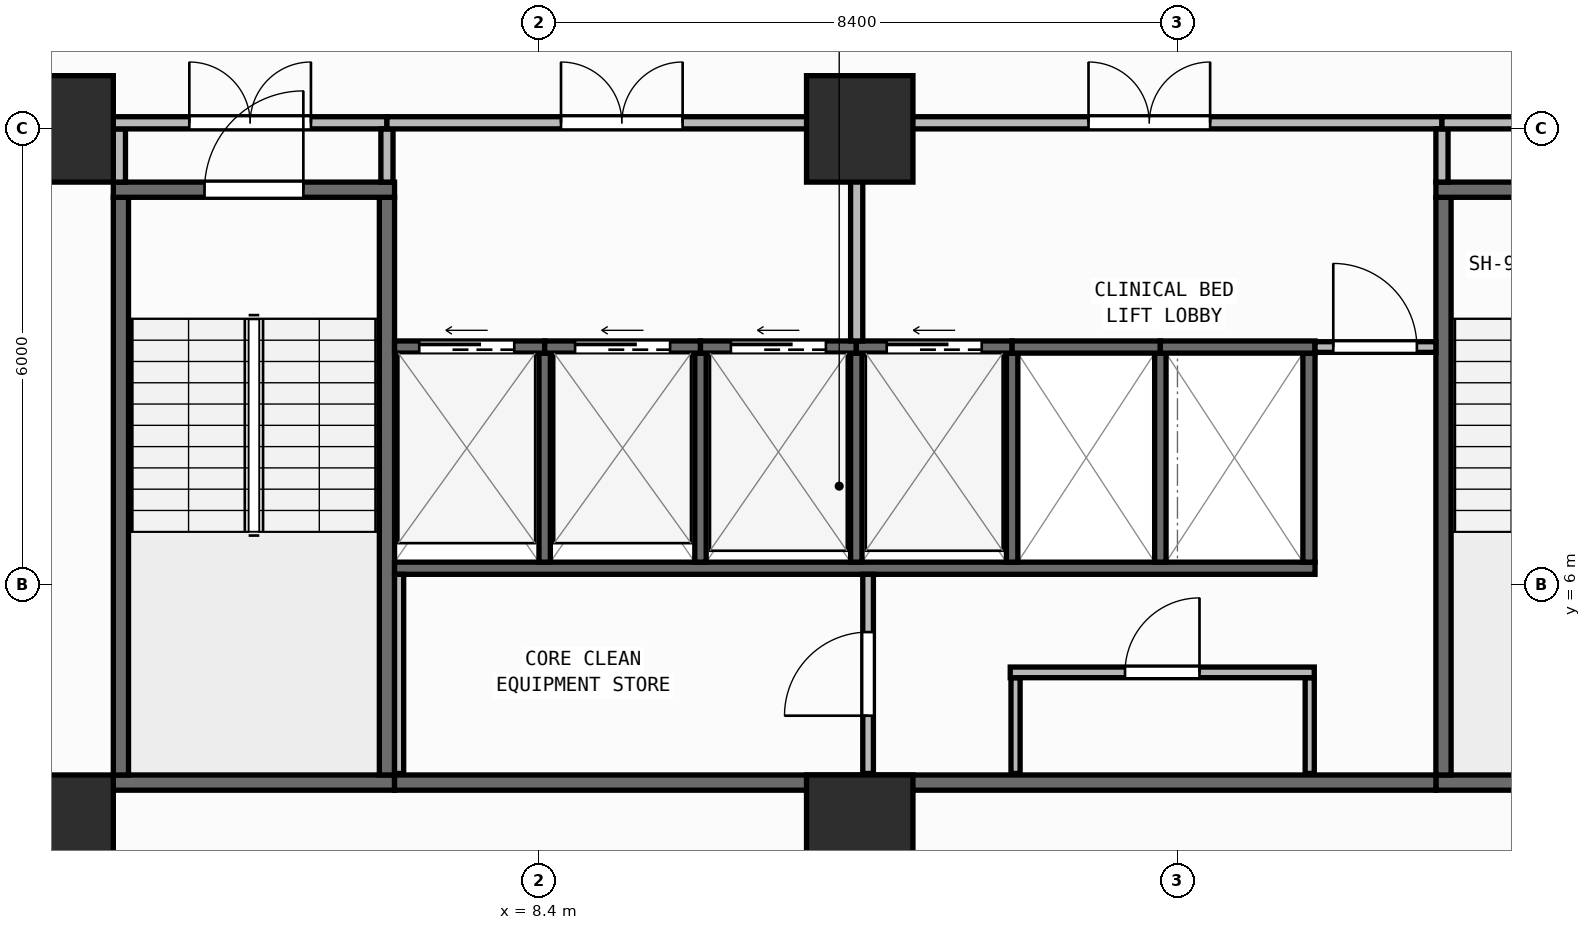
"""IFC4 building model, lengths in metres.
Left out: names, types, materials, properties, quantities, classifications, styles, units other than length and angle.
Written with IfcOpenShell. Run it as: python <this file> out.ifc"""

import sys

from ifc_helpers import new_model, si_unit, direction, frame, frame_2d, origin, origin_2d, place, context, subcontext, project, spatial, rectangle, extrude, element, fill, save


model = new_model("IFC4")
c1 = context("Model", 3, precision=1e-05, world=origin(), true_north=direction((0.0, 1.0)))
c2 = subcontext(c1, "Body", "Model", "MODEL_VIEW")
j1 = project(units=[si_unit("LENGTHUNIT", "METRE"), si_unit("PLANEANGLEUNIT", "RADIAN")], contexts=[c1])
p1 = place(None, origin())
s1 = spatial("IfcSite", under=j1, at=p1, CompositionType="ELEMENT")
p2 = place(p1, origin())
s2 = spatial("IfcBuilding", under=s1, at=p2, CompositionType="ELEMENT")
p3 = place(p2, frame((0.0, 0.0, 62.0)))
s3 = spatial("IfcBuildingStorey", under=s2, at=p3, CompositionType="ELEMENT", Elevation=62.0)
for number, where, z_axis, x_axis in (
    (1, (2.1, 2.8, 0.0), (0.0, 0.0, 1.0), (1.0, 0.0, 0.0)),
    (2, (12.62, 2.8, 0.0), (0.0, 0.0, 1.0), (1.0, 0.0, 0.0)),
    (3, (2.1, 12.0, 0.0), (0.0, 0.0, 1.0), (1.0, 0.0, 0.0)),
    (4, (12.62, 12.0, 0.0), (0.0, 0.0, 1.0), (1.0, 0.0, 0.0)),
):
    element("IfcColumn", number, at=place(p3, frame(where, z_axis=z_axis, x_axis=x_axis)), inside=s3, PredefinedType="COLUMN", context=c2, shape_type="SweptSolid", body=[
        extrude(rectangle(XDim=1.4, YDim=1.4, at=origin_2d()), origin(), (0.0, 0.0, 1.0), 3.95),
    ])
p4 = place(p3, frame((2.76, 0.174, 0.0), z_axis=(0.0, 0.0, 1.0), x_axis=(0.996571478456, 0.082736257641, 0.0)))
e5 = element("IfcWall", 5, at=p4, inside=s3, PredefinedType="STANDARD", context=c2, shape_type="SweptSolid", body=[
    extrude(rectangle(XDim=52.861, YDim=0.26, at=frame_2d((26.431, 0.0))), origin(), (0.0, 0.0, 1.0), 3.71),
])
p5 = place(p4, frame((25.231, 0.0, 0.9)))
e6 = element("IfcOpeningElement", 6, at=p5, cuts=e5, PredefinedType="OPENING", context=c2, shape_type="SweptSolid", body=[
    extrude(rectangle(XDim=2.4, YDim=1.65, at=frame_2d((1.2, 0.825))), frame((0.0, 0.14, 0.0), z_axis=(0.0, -1.0, 0.0), x_axis=(1.0, 0.0, 0.0)), (0.0, 0.0, 1.0), 0.28),
])
p6 = place(p3, frame((2.8, 3.4, 0.0), z_axis=(0.0, 0.0, 1.0), x_axis=(1.0, 0.0, 0.0)))
e7 = element("IfcWall", 7, at=p6, inside=s3, PredefinedType="SHEAR", context=c2, shape_type="SweptSolid", body=[
    extrude(rectangle(XDim=3.7, YDim=0.2, at=frame_2d((1.85, 0.0))), origin(), (0.0, 0.0, 1.0), 3.71),
])
for number, where, z_axis, x_axis in (
    (8, (2.9, 3.5, 0.0), (0.0, 0.0, 1.0), (0.0, 1.0, 0.0)),
    (9, (6.4, 3.5, 0.0), (0.0, 0.0, 1.0), (0.0, 1.0, 0.0)),
):
    element("IfcWall", number, at=place(p3, frame(where, z_axis=z_axis, x_axis=x_axis)), inside=s3, PredefinedType="SHEAR", context=c2, shape_type="SweptSolid", body=[
        extrude(rectangle(XDim=7.6, YDim=0.2, at=frame_2d((3.8, 0.0))), origin(), (0.0, 0.0, 1.0), 3.71),
    ])
p7 = place(p3, frame((2.8, 11.2, 0.0), z_axis=(0.0, 0.0, 1.0), x_axis=(1.0, 0.0, 0.0)))
e10 = element("IfcWall", 10, at=p7, inside=s3, PredefinedType="SHEAR", context=c2, shape_type="SweptSolid", body=[
    extrude(rectangle(XDim=3.7, YDim=0.2, at=frame_2d((1.85, 0.0))), origin(), (0.0, 0.0, 1.0), 3.71),
])
p8 = place(p7, frame((1.2, 0.0, 0.0)))
e11 = element("IfcOpeningElement", 11, at=p8, cuts=e10, PredefinedType="OPENING", context=c2, shape_type="SweptSolid", body=[
    extrude(rectangle(XDim=1.3, YDim=2.15, at=frame_2d((0.65, 1.075))), frame((0.0, 0.11, 0.0), z_axis=(0.0, -1.0, 0.0), x_axis=(1.0, 0.0, 0.0)), (0.0, 0.0, 1.0), 0.22),
])
p9 = place(p3, frame((20.2, 3.4, 0.0), z_axis=(0.0, 0.0, 1.0), x_axis=(1.0, 0.0, 0.0)))
e12 = element("IfcWall", 12, at=p9, inside=s3, PredefinedType="SHEAR", context=c2, shape_type="SweptSolid", body=[
    extrude(rectangle(XDim=3.7, YDim=0.2, at=frame_2d((1.85, 0.0))), origin(), (0.0, 0.0, 1.0), 3.71),
])
p10 = place(p3, frame((20.3, 3.5, 0.0), z_axis=(0.0, 0.0, 1.0), x_axis=(0.0, 1.0, 0.0)))
e13 = element("IfcWall", 13, at=p10, inside=s3, PredefinedType="SHEAR", context=c2, shape_type="SweptSolid", body=[
    extrude(rectangle(XDim=7.6, YDim=0.2, at=frame_2d((3.8, 0.0))), origin(), (0.0, 0.0, 1.0), 3.71),
])
p11 = place(p3, frame((20.2, 11.2, 0.0), z_axis=(0.0, 0.0, 1.0), x_axis=(1.0, 0.0, 0.0)))
e14 = element("IfcWall", 14, at=p11, inside=s3, PredefinedType="SHEAR", context=c2, shape_type="SweptSolid", body=[
    extrude(rectangle(XDim=3.7, YDim=0.2, at=frame_2d((1.85, 0.0))), origin(), (0.0, 0.0, 1.0), 3.71),
])
p12 = place(p11, frame((1.2, 0.0, 0.0)))
e15 = element("IfcOpeningElement", 15, at=p12, cuts=e14, PredefinedType="OPENING", context=c2, shape_type="SweptSolid", body=[
    extrude(rectangle(XDim=1.3, YDim=2.15, at=frame_2d((0.65, 1.075))), frame((0.0, 0.11, 0.0), z_axis=(0.0, -1.0, 0.0), x_axis=(1.0, 0.0, 0.0)), (0.0, 0.0, 1.0), 0.22),
])
p13 = place(p3, frame((6.5, 3.4, 0.0), z_axis=(0.0, 0.0, 1.0), x_axis=(1.0, 0.0, 0.0)))
e16 = element("IfcWall", 16, at=p13, inside=s3, PredefinedType="SHEAR", context=c2, shape_type="SweptSolid", body=[
    extrude(rectangle(XDim=13.7, YDim=0.2, at=frame_2d((6.85, 0.0))), origin(), (0.0, 0.0, 1.0), 3.71),
])
p14 = place(p3, frame((6.5, 6.22, 0.0), z_axis=(0.0, 0.0, 1.0), x_axis=(1.0, 0.0, 0.0)))
e17 = element("IfcWall", 17, at=p14, inside=s3, PredefinedType="SHEAR", context=c2, shape_type="SweptSolid", body=[
    extrude(rectangle(XDim=12.11, YDim=0.16, at=frame_2d((6.055, 0.0))), origin(), (0.0, 0.0, 1.0), 3.71),
])
p15 = place(p3, frame((18.53, 6.3, 0.0), z_axis=(0.0, 0.0, 1.0), x_axis=(0.0, 1.0, 0.0)))
e18 = element("IfcWall", 18, at=p15, inside=s3, PredefinedType="SHEAR", context=c2, shape_type="SweptSolid", body=[
    extrude(rectangle(XDim=2.75, YDim=0.16, at=frame_2d((1.375, 0.0))), origin(), (0.0, 0.0, 1.0), 3.71),
])
for number, where, z_axis, x_axis in (
    (19, (8.475, 6.3, 0.0), (0.0, 0.0, 1.0), (0.0, 1.0, 0.0)),
    (20, (10.525, 6.3, 0.0), (0.0, 0.0, 1.0), (0.0, 1.0, 0.0)),
    (21, (12.575, 6.3, 0.0), (0.0, 0.0, 1.0), (0.0, 1.0, 0.0)),
    (22, (14.625, 6.3, 0.0), (0.0, 0.0, 1.0), (0.0, 1.0, 0.0)),
    (23, (16.575, 6.3, 0.0), (0.0, 0.0, 1.0), (0.0, 1.0, 0.0)),
):
    element("IfcWall", number, at=place(p3, frame(where, z_axis=z_axis, x_axis=x_axis)), inside=s3, PredefinedType="SHEAR", context=c2, shape_type="SweptSolid", body=[
        extrude(rectangle(XDim=2.75, YDim=0.15, at=frame_2d((1.375, 0.0))), origin(), (0.0, 0.0, 1.0), 3.71),
    ])
p16 = place(p3, frame((6.5, 9.13, 0.0), z_axis=(0.0, 0.0, 1.0), x_axis=(1.0, 0.0, 0.0)))
e24 = element("IfcWall", 24, at=p16, inside=s3, PredefinedType="SHEAR", context=c2, shape_type="SweptSolid", body=[
    extrude(rectangle(XDim=1.975, YDim=0.16, at=frame_2d((0.988, 0.0))), origin(), (0.0, 0.0, 1.0), 3.71),
])
p17 = place(p16, frame((0.325, 0.0, 0.0)))
e25 = element("IfcOpeningElement", 25, at=p17, cuts=e24, PredefinedType="OPENING", context=c2, shape_type="SweptSolid", body=[
    extrude(rectangle(XDim=1.25, YDim=2.15, at=frame_2d((0.625, 1.075))), frame((0.0, 0.09, 0.0), z_axis=(0.0, -1.0, 0.0), x_axis=(1.0, 0.0, 0.0)), (0.0, 0.0, 1.0), 0.18),
])
p18 = place(p3, frame((8.475, 9.13, 0.0), z_axis=(0.0, 0.0, 1.0), x_axis=(1.0, 0.0, 0.0)))
e26 = element("IfcWall", 26, at=p18, inside=s3, PredefinedType="SHEAR", context=c2, shape_type="SweptSolid", body=[
    extrude(rectangle(XDim=2.05, YDim=0.16, at=frame_2d((1.025, 0.0))), origin(), (0.0, 0.0, 1.0), 3.71),
])
p19 = place(p18, frame((0.4, 0.0, 0.0)))
e27 = element("IfcOpeningElement", 27, at=p19, cuts=e26, PredefinedType="OPENING", context=c2, shape_type="SweptSolid", body=[
    extrude(rectangle(XDim=1.25, YDim=2.15, at=frame_2d((0.625, 1.075))), frame((0.0, 0.09, 0.0), z_axis=(0.0, -1.0, 0.0), x_axis=(1.0, 0.0, 0.0)), (0.0, 0.0, 1.0), 0.18),
])
p20 = place(p3, frame((10.525, 9.13, 0.0), z_axis=(0.0, 0.0, 1.0), x_axis=(1.0, 0.0, 0.0)))
e28 = element("IfcWall", 28, at=p20, inside=s3, PredefinedType="SHEAR", context=c2, shape_type="SweptSolid", body=[
    extrude(rectangle(XDim=2.05, YDim=0.16, at=frame_2d((1.025, 0.0))), origin(), (0.0, 0.0, 1.0), 3.71),
])
p21 = place(p20, frame((0.4, 0.0, 0.0)))
e29 = element("IfcOpeningElement", 29, at=p21, cuts=e28, PredefinedType="OPENING", context=c2, shape_type="SweptSolid", body=[
    extrude(rectangle(XDim=1.25, YDim=2.15, at=frame_2d((0.625, 1.075))), frame((0.0, 0.09, 0.0), z_axis=(0.0, -1.0, 0.0), x_axis=(1.0, 0.0, 0.0)), (0.0, 0.0, 1.0), 0.18),
])
p22 = place(p3, frame((12.575, 9.13, 0.0), z_axis=(0.0, 0.0, 1.0), x_axis=(1.0, 0.0, 0.0)))
e30 = element("IfcWall", 30, at=p22, inside=s3, PredefinedType="SHEAR", context=c2, shape_type="SweptSolid", body=[
    extrude(rectangle(XDim=2.05, YDim=0.16, at=frame_2d((1.025, 0.0))), origin(), (0.0, 0.0, 1.0), 3.71),
])
p23 = place(p22, frame((0.4, 0.0, 0.0)))
e31 = element("IfcOpeningElement", 31, at=p23, cuts=e30, PredefinedType="OPENING", context=c2, shape_type="SweptSolid", body=[
    extrude(rectangle(XDim=1.25, YDim=2.15, at=frame_2d((0.625, 1.075))), frame((0.0, 0.09, 0.0), z_axis=(0.0, -1.0, 0.0), x_axis=(1.0, 0.0, 0.0)), (0.0, 0.0, 1.0), 0.18),
])
p24 = place(p3, frame((14.625, 9.13, 0.0), z_axis=(0.0, 0.0, 1.0), x_axis=(1.0, 0.0, 0.0)))
e32 = element("IfcWall", 32, at=p24, inside=s3, PredefinedType="SHEAR", context=c2, shape_type="SweptSolid", body=[
    extrude(rectangle(XDim=1.95, YDim=0.16, at=frame_2d((0.975, 0.0))), origin(), (0.0, 0.0, 1.0), 3.71),
])
p25 = place(p3, frame((16.575, 9.13, 0.0), z_axis=(0.0, 0.0, 1.0), x_axis=(1.0, 0.0, 0.0)))
e33 = element("IfcWall", 33, at=p25, inside=s3, PredefinedType="SHEAR", context=c2, shape_type="SweptSolid", body=[
    extrude(rectangle(XDim=2.035, YDim=0.16, at=frame_2d((1.018, 0.0))), origin(), (0.0, 0.0, 1.0), 3.71),
])
p26 = place(p3, frame((6.56, 3.52, 0.0), z_axis=(0.0, 0.0, 1.0), x_axis=(0.0, 1.0, 0.0)))
e34 = element("IfcWall", 34, at=p26, inside=s3, PredefinedType="PARTITIONING", context=c2, shape_type="SweptSolid", body=[
    extrude(rectangle(XDim=2.62, YDim=0.12, at=frame_2d((1.31, 0.0))), origin(), (0.0, 0.0, 1.0), 3.71),
])
p27 = place(p3, frame((12.73, 3.52, 0.0), z_axis=(0.0, 0.0, 1.0), x_axis=(0.0, 1.0, 0.0)))
e35 = element("IfcWall", 35, at=p27, inside=s3, PredefinedType="PARTITIONING", context=c2, shape_type="SweptSolid", body=[
    extrude(rectangle(XDim=2.62, YDim=0.14, at=frame_2d((1.31, 0.0))), origin(), (0.0, 0.0, 1.0), 3.71),
])
p28 = place(p27, frame((0.76, 0.0, 0.0)))
e36 = element("IfcOpeningElement", 36, at=p28, cuts=e35, PredefinedType="OPENING", context=c2, shape_type="SweptSolid", body=[
    extrude(rectangle(XDim=1.1, YDim=2.1, at=frame_2d((0.55, 1.05))), frame((0.0, 0.08, 0.0), z_axis=(0.0, -1.0, 0.0), x_axis=(1.0, 0.0, 0.0)), (0.0, 0.0, 1.0), 0.16),
])
for number, where, z_axis, x_axis in (
    (37, (14.67, 3.52, 0.0), (0.0, 0.0, 1.0), (0.0, 1.0, 0.0)),
    (38, (18.54, 3.52, 0.0), (0.0, 0.0, 1.0), (0.0, 1.0, 0.0)),
):
    element("IfcWall", number, at=place(p3, frame(where, z_axis=z_axis, x_axis=x_axis)), inside=s3, PredefinedType="PARTITIONING", context=c2, shape_type="SweptSolid", body=[
        extrude(rectangle(XDim=1.26, YDim=0.12, at=frame_2d((0.63, 0.0))), origin(), (0.0, 0.0, 1.0), 3.71),
    ])
p29 = place(p3, frame((14.6, 4.85, 0.0), z_axis=(0.0, 0.0, 1.0), x_axis=(1.0, 0.0, 0.0)))
e39 = element("IfcWall", 39, at=p29, inside=s3, PredefinedType="PARTITIONING", context=c2, shape_type="SweptSolid", body=[
    extrude(rectangle(XDim=4.0, YDim=0.14, at=frame_2d((2.0, 0.0))), origin(), (0.0, 0.0, 1.0), 3.71),
])
p30 = place(p29, frame((1.51, 0.0, 0.0)))
e40 = element("IfcOpeningElement", 40, at=p30, cuts=e39, PredefinedType="OPENING", context=c2, shape_type="SweptSolid", body=[
    extrude(rectangle(XDim=0.98, YDim=2.1, at=frame_2d((0.49, 1.05))), frame((0.0, 0.08, 0.0), z_axis=(0.0, -1.0, 0.0), x_axis=(1.0, 0.0, 0.0)), (0.0, 0.0, 1.0), 0.16),
])
p31 = place(p3, frame((18.61, 9.13, 0.0), z_axis=(0.0, 0.0, 1.0), x_axis=(1.0, 0.0, 0.0)))
e41 = element("IfcWall", 41, at=p31, inside=s3, PredefinedType="PARTITIONING", context=c2, shape_type="SweptSolid", body=[
    extrude(rectangle(XDim=1.59, YDim=0.14, at=frame_2d((0.795, 0.0))), origin(), (0.0, 0.0, 1.0), 3.71),
])
p32 = place(p31, frame((0.24, 0.0, 0.0)))
e42 = element("IfcOpeningElement", 42, at=p32, cuts=e41, PredefinedType="OPENING", context=c2, shape_type="SweptSolid", body=[
    extrude(rectangle(XDim=1.1, YDim=2.1, at=frame_2d((0.55, 1.05))), frame((0.0, 0.08, 0.0), z_axis=(0.0, -1.0, 0.0), x_axis=(1.0, 0.0, 0.0)), (0.0, 0.0, 1.0), 0.16),
])
p33 = place(p3, frame((2.88, 11.3, 0.0), z_axis=(0.0, 0.0, 1.0), x_axis=(0.0, 1.0, 0.0)))
e43 = element("IfcWall", 43, at=p33, inside=s3, PredefinedType="PARTITIONING", context=c2, shape_type="SweptSolid", body=[
    extrude(rectangle(XDim=0.7, YDim=0.16, at=frame_2d((0.35, 0.0))), origin(), (0.0, 0.0, 1.0), 3.71),
])
p34 = place(p3, frame((2.8, 12.08, 0.0), z_axis=(0.0, 0.0, 1.0), x_axis=(1.0, 0.0, 0.0)))
e44 = element("IfcWall", 44, at=p34, inside=s3, PredefinedType="PARTITIONING", context=c2, shape_type="SweptSolid", body=[
    extrude(rectangle(XDim=3.6, YDim=0.16, at=frame_2d((1.8, 0.0))), origin(), (0.0, 0.0, 1.0), 3.073),
])
p35 = place(p34, frame((1.0, 0.0, 0.0)))
e45 = element("IfcOpeningElement", 45, at=p35, cuts=e44, PredefinedType="OPENING", context=c2, shape_type="SweptSolid", body=[
    extrude(rectangle(XDim=1.6, YDim=2.05, at=frame_2d((0.8, 1.025))), frame((0.0, 0.09, 0.0), z_axis=(0.0, -1.0, 0.0), x_axis=(1.0, 0.0, 0.0)), (0.0, 0.0, 1.0), 0.18),
])
p36 = place(p3, frame((6.4, 11.3, 0.0), z_axis=(0.0, 0.0, 1.0), x_axis=(0.0, 1.0, 0.0)))
e46 = element("IfcWall", 46, at=p36, inside=s3, PredefinedType="PARTITIONING", context=c2, shape_type="SweptSolid", body=[
    extrude(rectangle(XDim=0.7, YDim=0.16, at=frame_2d((0.35, 0.0))), origin(), (0.0, 0.0, 1.0), 3.71),
])
p37 = place(p3, frame((6.4, 12.08, 0.0), z_axis=(0.0, 0.0, 1.0), x_axis=(1.0, 0.0, 0.0)))
e47 = element("IfcWall", 47, at=p37, inside=s3, PredefinedType="PARTITIONING", context=c2, shape_type="SweptSolid", body=[
    extrude(rectangle(XDim=6.18, YDim=0.16, at=frame_2d((3.09, 0.0))), origin(), (0.0, 0.0, 1.0), 3.073),
])
p38 = place(p37, frame((2.29, 0.0, 0.0)))
e48 = element("IfcOpeningElement", 48, at=p38, cuts=e47, PredefinedType="OPENING", context=c2, shape_type="SweptSolid", body=[
    extrude(rectangle(XDim=1.6, YDim=2.05, at=frame_2d((0.8, 1.025))), frame((0.0, 0.09, 0.0), z_axis=(0.0, -1.0, 0.0), x_axis=(1.0, 0.0, 0.0)), (0.0, 0.0, 1.0), 0.18),
])
p39 = place(p3, frame((12.58, 9.21, 0.0), z_axis=(0.0, 0.0, 1.0), x_axis=(0.0, 1.0, 0.0)))
e49 = element("IfcWall", 49, at=p39, inside=s3, PredefinedType="PARTITIONING", context=c2, shape_type="SweptSolid", body=[
    extrude(rectangle(XDim=2.79, YDim=0.16, at=frame_2d((1.395, 0.0))), origin(), (0.0, 0.0, 1.0), 3.71),
])
p40 = place(p3, frame((12.58, 12.08, 0.0), z_axis=(0.0, 0.0, 1.0), x_axis=(1.0, 0.0, 0.0)))
e50 = element("IfcWall", 50, at=p40, inside=s3, PredefinedType="PARTITIONING", context=c2, shape_type="SweptSolid", body=[
    extrude(rectangle(XDim=7.7, YDim=0.16, at=frame_2d((3.85, 0.0))), origin(), (0.0, 0.0, 1.0), 3.073),
])
p41 = place(p40, frame((3.05, 0.0, 0.0)))
e51 = element("IfcOpeningElement", 51, at=p41, cuts=e50, PredefinedType="OPENING", context=c2, shape_type="SweptSolid", body=[
    extrude(rectangle(XDim=1.6, YDim=2.05, at=frame_2d((0.8, 1.025))), frame((0.0, 0.09, 0.0), z_axis=(0.0, -1.0, 0.0), x_axis=(1.0, 0.0, 0.0)), (0.0, 0.0, 1.0), 0.18),
])
p42 = place(p3, frame((20.28, 11.3, 0.0), z_axis=(0.0, 0.0, 1.0), x_axis=(0.0, 1.0, 0.0)))
e52 = element("IfcWall", 52, at=p42, inside=s3, PredefinedType="PARTITIONING", context=c2, shape_type="SweptSolid", body=[
    extrude(rectangle(XDim=0.7, YDim=0.16, at=frame_2d((0.35, 0.0))), origin(), (0.0, 0.0, 1.0), 3.71),
])
p43 = place(p3, frame((20.28, 12.08, 0.0), z_axis=(0.0, 0.0, 1.0), x_axis=(1.0, 0.0, 0.0)))
e53 = element("IfcWall", 53, at=p43, inside=s3, PredefinedType="PARTITIONING", context=c2, shape_type="SweptSolid", body=[
    extrude(rectangle(XDim=3.62, YDim=0.16, at=frame_2d((1.81, 0.0))), origin(), (0.0, 0.0, 1.0), 3.073),
])
p44 = place(p43, frame((1.01, 0.0, 0.0)))
e54 = element("IfcOpeningElement", 54, at=p44, cuts=e53, PredefinedType="OPENING", context=c2, shape_type="SweptSolid", body=[
    extrude(rectangle(XDim=1.6, YDim=2.05, at=frame_2d((0.8, 1.025))), frame((0.0, 0.09, 0.0), z_axis=(0.0, -1.0, 0.0), x_axis=(1.0, 0.0, 0.0)), (0.0, 0.0, 1.0), 0.18),
])
p45 = place(p8, origin())
e55 = element("IfcDoor", 55, at=p45, inside=s3, OperationType="SINGLE_SWING_RIGHT", PredefinedType="DOOR", context=c2, shape_type="SweptSolid", body=[
    extrude(rectangle(XDim=1.3, YDim=2.15, at=frame_2d((0.65, 1.075))), frame((0.0, 0.025, 0.0), z_axis=(0.0, -1.0, 0.0), x_axis=(1.0, 0.0, 0.0)), (0.0, 0.0, 1.0), 0.05),
])
fill(e11, e55)
p46 = place(p17, origin())
e56 = element("IfcDoor", 56, at=p46, inside=s3, OperationType="SLIDING_TO_LEFT", PredefinedType="DOOR", context=c2, shape_type="SweptSolid", body=[
    extrude(rectangle(XDim=1.25, YDim=2.15, at=frame_2d((0.625, 1.075))), frame((0.0, 0.025, 0.0), z_axis=(0.0, -1.0, 0.0), x_axis=(1.0, 0.0, 0.0)), (0.0, 0.0, 1.0), 0.05),
])
fill(e25, e56)
p47 = place(p19, origin())
e57 = element("IfcDoor", 57, at=p47, inside=s3, OperationType="SLIDING_TO_LEFT", PredefinedType="DOOR", context=c2, shape_type="SweptSolid", body=[
    extrude(rectangle(XDim=1.25, YDim=2.15, at=frame_2d((0.625, 1.075))), frame((0.0, 0.025, 0.0), z_axis=(0.0, -1.0, 0.0), x_axis=(1.0, 0.0, 0.0)), (0.0, 0.0, 1.0), 0.05),
])
fill(e27, e57)
p48 = place(p21, origin())
e58 = element("IfcDoor", 58, at=p48, inside=s3, OperationType="SLIDING_TO_LEFT", PredefinedType="DOOR", context=c2, shape_type="SweptSolid", body=[
    extrude(rectangle(XDim=1.25, YDim=2.15, at=frame_2d((0.625, 1.075))), frame((0.0, 0.025, 0.0), z_axis=(0.0, -1.0, 0.0), x_axis=(1.0, 0.0, 0.0)), (0.0, 0.0, 1.0), 0.05),
])
fill(e29, e58)
p49 = place(p23, origin())
e59 = element("IfcDoor", 59, at=p49, inside=s3, OperationType="SLIDING_TO_LEFT", PredefinedType="DOOR", context=c2, shape_type="SweptSolid", body=[
    extrude(rectangle(XDim=1.25, YDim=2.15, at=frame_2d((0.625, 1.075))), frame((0.0, 0.025, 0.0), z_axis=(0.0, -1.0, 0.0), x_axis=(1.0, 0.0, 0.0)), (0.0, 0.0, 1.0), 0.05),
])
fill(e31, e59)
p50 = place(p28, origin())
e60 = element("IfcDoor", 60, at=p50, inside=s3, OperationType="SINGLE_SWING_LEFT", PredefinedType="DOOR", context=c2, shape_type="SweptSolid", body=[
    extrude(rectangle(XDim=1.1, YDim=2.1, at=frame_2d((0.55, 1.05))), frame((0.0, 0.025, 0.0), z_axis=(0.0, -1.0, 0.0), x_axis=(1.0, 0.0, 0.0)), (0.0, 0.0, 1.0), 0.05),
])
fill(e36, e60)
p51 = place(p30, origin())
e61 = element("IfcDoor", 61, at=p51, inside=s3, OperationType="SINGLE_SWING_RIGHT", PredefinedType="DOOR", context=c2, shape_type="SweptSolid", body=[
    extrude(rectangle(XDim=0.98, YDim=2.1, at=frame_2d((0.49, 1.05))), frame((0.0, 0.025, 0.0), z_axis=(0.0, -1.0, 0.0), x_axis=(1.0, 0.0, 0.0)), (0.0, 0.0, 1.0), 0.05),
])
fill(e40, e61)
p52 = place(p32, origin())
e62 = element("IfcDoor", 62, at=p52, inside=s3, OperationType="SINGLE_SWING_LEFT", PredefinedType="DOOR", context=c2, shape_type="SweptSolid", body=[
    extrude(rectangle(XDim=1.1, YDim=2.1, at=frame_2d((0.55, 1.05))), frame((0.0, 0.025, 0.0), z_axis=(0.0, -1.0, 0.0), x_axis=(1.0, 0.0, 0.0)), (0.0, 0.0, 1.0), 0.05),
])
fill(e42, e62)
p53 = place(p35, origin())
e63 = element("IfcDoor", 63, at=p53, inside=s3, OperationType="DOUBLE_DOOR_SINGLE_SWING", PredefinedType="DOOR", context=c2, shape_type="SweptSolid", body=[
    extrude(rectangle(XDim=1.6, YDim=2.05, at=frame_2d((0.8, 1.025))), frame((0.0, 0.025, 0.0), z_axis=(0.0, -1.0, 0.0), x_axis=(1.0, 0.0, 0.0)), (0.0, 0.0, 1.0), 0.05),
])
fill(e45, e63)
p54 = place(p38, origin())
e64 = element("IfcDoor", 64, at=p54, inside=s3, OperationType="DOUBLE_DOOR_SINGLE_SWING", PredefinedType="DOOR", context=c2, shape_type="SweptSolid", body=[
    extrude(rectangle(XDim=1.6, YDim=2.05, at=frame_2d((0.8, 1.025))), frame((0.0, 0.025, 0.0), z_axis=(0.0, -1.0, 0.0), x_axis=(1.0, 0.0, 0.0)), (0.0, 0.0, 1.0), 0.05),
])
fill(e48, e64)
p55 = place(p41, origin())
e65 = element("IfcDoor", 65, at=p55, inside=s3, OperationType="DOUBLE_DOOR_SINGLE_SWING", PredefinedType="DOOR", context=c2, shape_type="SweptSolid", body=[
    extrude(rectangle(XDim=1.6, YDim=2.05, at=frame_2d((0.8, 1.025))), frame((0.0, 0.025, 0.0), z_axis=(0.0, -1.0, 0.0), x_axis=(1.0, 0.0, 0.0)), (0.0, 0.0, 1.0), 0.05),
])
fill(e51, e65)
save(model, sys.argv[1])
